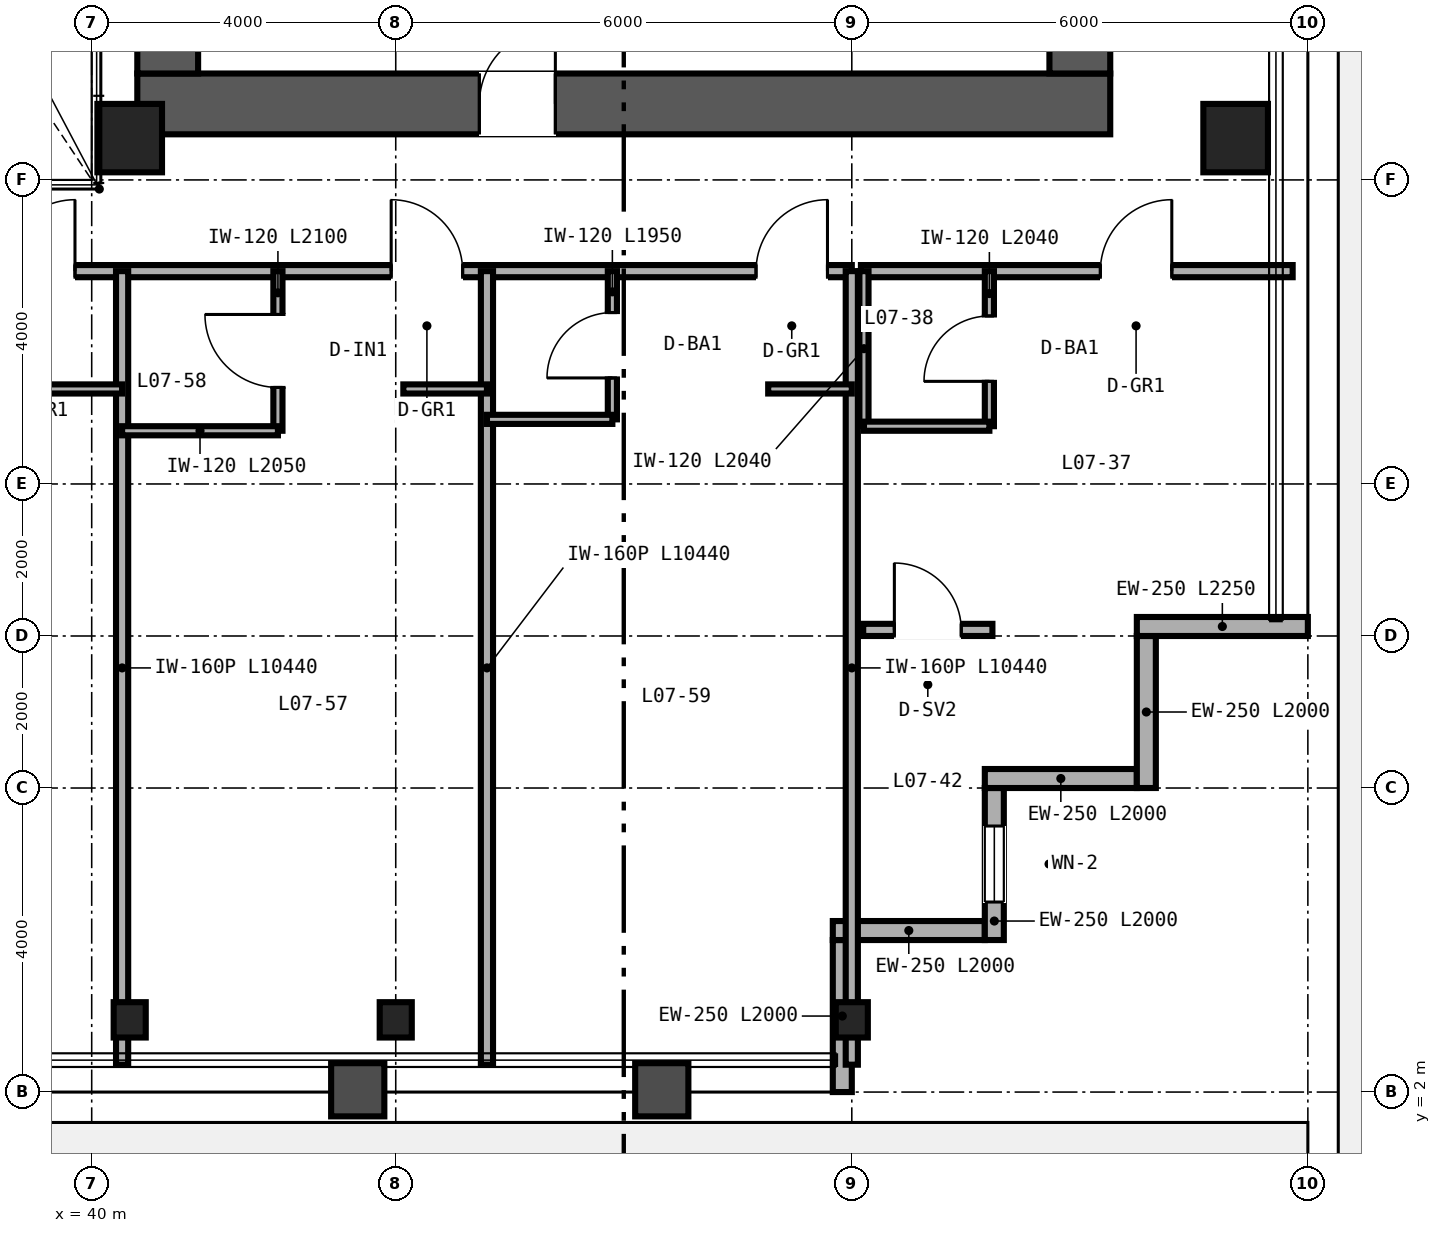
"""IFC4 building model, lengths in metres.
Left out: names, types, materials, properties, quantities, classifications, styles, units other than length and angle.
Written with IfcOpenShell. Run it as: python <this file> out.ifc"""

import sys

from ifc_helpers import new_model, si_unit, direction, frame, frame_2d, origin, origin_2d, place, context, subcontext, project, spatial, rectangle, hollow_rectangle, i_section, extrude, source, transform, mapped, element, fill, save


model = new_model("IFC4")
c1 = context("Model", 3, precision=1e-05, world=origin(), true_north=direction((0.0, 1.0)))
c2 = subcontext(c1, "Body", "Model", "MODEL_VIEW")
j1 = project(units=[si_unit("LENGTHUNIT", "METRE"), si_unit("PLANEANGLEUNIT", "RADIAN")], contexts=[c1])
p1 = place(None, origin())
s1 = spatial("IfcSite", under=j1, at=p1, CompositionType="ELEMENT")
p2 = place(p1, origin())
s2 = spatial("IfcBuilding", under=s1, at=p2, CompositionType="ELEMENT")
p3 = place(p2, frame((0.0, 0.0, 34.8)))
s3 = spatial("IfcBuildingStorey", under=s2, at=p3, CompositionType="ELEMENT", Elevation=34.8)
p4 = place(p3, frame((40.6, 15.0, 0.0), z_axis=(0.0, 0.0, 1.0), x_axis=(1.0, 0.0, 0.0)))
e1 = element("IfcWall", 1, at=p4, inside=s3, PredefinedType="SHEAR", context=c2, shape_type="SweptSolid", body=[
    extrude(rectangle(XDim=12.8, YDim=0.8, at=frame_2d((6.4, 0.0))), origin(), (0.0, 0.0, 1.0), 3.35),
])
p5 = place(p4, frame((4.5, 0.0, 0.0)))
e2 = element("IfcOpeningElement", 2, at=p5, cuts=e1, PredefinedType="OPENING", context=c2, shape_type="SweptSolid", body=[
    extrude(rectangle(XDim=1.0, YDim=2.15, at=frame_2d((0.5, 1.075))), frame((0.0, 0.41, 0.0), z_axis=(0.0, -1.0, 0.0), x_axis=(1.0, 0.0, 0.0)), (0.0, 0.0, 1.0), 0.82),
])
for number, where, z_axis, x_axis in (
    (3, (41.0, 15.4, 0.0), (0.0, 0.0, 1.0), (0.0, 1.0, 0.0)),
    (4, (53.0, 15.4, 0.0), (0.0, 0.0, 1.0), (0.0, 1.0, 0.0)),
):
    element("IfcWall", number, at=place(p3, frame(where, z_axis=z_axis, x_axis=x_axis)), inside=s3, PredefinedType="SHEAR", context=c2, shape_type="SweptSolid", body=[
        extrude(rectangle(XDim=21.2, YDim=0.8, at=frame_2d((10.6, 0.0))), origin(), (0.0, 0.0, 1.0), 3.35),
    ])
m1 = source(origin(), c2, "Body", "SweptSolid", [
    extrude(hollow_rectangle(XDim=0.85, YDim=0.9, WallThickness=0.04, at=origin_2d()), origin(), (0.0, 0.0, 1.0), 3.35),
])
for number, where, z_axis, x_axis in (
    (5, (40.5, 14.55, 0.0), (0.0, 0.0, 1.0), (1.0, 0.0, 0.0)),
    (6, (55.05, 14.55, 0.0), (0.0, 0.0, 1.0), (1.0, 0.0, 0.0)),
):
    element("IfcColumn", number, at=place(p3, frame(where, z_axis=z_axis, x_axis=x_axis)), inside=s3, PredefinedType="COLUMN", context=c2, shape_type="MappedRepresentation", body=[
        mapped(m1, transform((0.0, 0.0, 0.0), scale=1.0)),
    ])
m2 = source(origin(), c2, "Body", "SweptSolid", [
    extrude(i_section(OverallWidth=0.422, OverallDepth=0.465, WebThickness=0.045, FlangeThickness=0.073, FilletRadius=0.025, at=origin_2d()), origin(), (0.0, 0.0, 1.0), 3.35),
])
for number, where, z_axis, x_axis in (
    (7, (40.5, 2.95, 0.0), (0.0, 0.0, 1.0), (1.0, 0.0, 0.0)),
    (8, (44.0, 2.95, 0.0), (0.0, 0.0, 1.0), (1.0, 0.0, 0.0)),
    (9, (50.0, 2.95, 0.0), (0.0, 0.0, 1.0), (1.0, 0.0, 0.0)),
):
    element("IfcColumn", number, at=place(p3, frame(where, z_axis=z_axis, x_axis=x_axis)), inside=s3, PredefinedType="COLUMN", context=c2, shape_type="MappedRepresentation", body=[
        mapped(m2, transform((0.0, 0.0, 0.0), scale=1.0)),
    ])
p6 = place(p3, frame((49.875, 2.0, 0.0), z_axis=(0.0, 0.0, 1.0), x_axis=(0.0, 1.0, 0.0)))
e10 = element("IfcWall", 10, at=p6, inside=s3, PredefinedType="SOLIDWALL", context=c2, shape_type="SweptSolid", body=[
    extrude(rectangle(XDim=2.0, YDim=0.25, at=frame_2d((1.0, 0.0))), origin(), (0.0, 0.0, 1.0), 2.657),
])
p7 = place(p3, frame((49.75, 4.125, 0.0), z_axis=(0.0, 0.0, 1.0), x_axis=(1.0, 0.0, 0.0)))
e11 = element("IfcWall", 11, at=p7, inside=s3, PredefinedType="SOLIDWALL", context=c2, shape_type="SweptSolid", body=[
    extrude(rectangle(XDim=2.0, YDim=0.25, at=frame_2d((1.0, 0.0))), origin(), (0.0, 0.0, 1.0), 3.35),
])
p8 = place(p3, frame((51.875, 4.0, 0.0), z_axis=(0.0, 0.0, 1.0), x_axis=(0.0, 1.0, 0.0)))
e12 = element("IfcWall", 12, at=p8, inside=s3, PredefinedType="SOLIDWALL", context=c2, shape_type="SweptSolid", body=[
    extrude(rectangle(XDim=2.0, YDim=0.25, at=frame_2d((1.0, 0.0))), origin(), (0.0, 0.0, 1.0), 3.35),
])
p9 = place(p8, frame((0.5, 0.0, 0.85)))
e13 = element("IfcOpeningElement", 13, at=p9, cuts=e12, PredefinedType="OPENING", context=c2, shape_type="SweptSolid", body=[
    extrude(rectangle(XDim=1.0, YDim=1.9, at=frame_2d((0.5, 0.95))), frame((0.0, 0.135, 0.0), z_axis=(0.0, -1.0, 0.0), x_axis=(1.0, 0.0, 0.0)), (0.0, 0.0, 1.0), 0.27),
])
for number, where, z_axis, x_axis in (
    (14, (51.75, 6.125, 0.0), (0.0, 0.0, 1.0), (1.0, 0.0, 0.0)),
    (15, (53.875, 6.0, 0.0), (0.0, 0.0, 1.0), (0.0, 1.0, 0.0)),
):
    element("IfcWall", number, at=place(p3, frame(where, z_axis=z_axis, x_axis=x_axis)), inside=s3, PredefinedType="SOLIDWALL", context=c2, shape_type="SweptSolid", body=[
        extrude(rectangle(XDim=2.0, YDim=0.25, at=frame_2d((1.0, 0.0))), origin(), (0.0, 0.0, 1.0), 3.35),
    ])
p10 = place(p3, frame((53.75, 8.125, 0.0), z_axis=(0.0, 0.0, 1.0), x_axis=(1.0, 0.0, 0.0)))
e16 = element("IfcWall", 16, at=p10, inside=s3, PredefinedType="SOLIDWALL", context=c2, shape_type="SweptSolid", body=[
    extrude(rectangle(XDim=2.25, YDim=0.25, at=frame_2d((1.125, 0.0))), origin(), (0.0, 0.0, 1.0), 3.35),
])
p11 = place(p3, frame((50.12, 12.8, 0.0), z_axis=(0.0, 0.0, 1.0), x_axis=(1.0, 0.0, 0.0)))
e17 = element("IfcWall", 17, at=p11, inside=s3, PredefinedType="PARTITIONING", context=c2, shape_type="SweptSolid", body=[
    extrude(rectangle(XDim=5.68, YDim=0.16, at=frame_2d((2.84, 0.0))), origin(), (0.0, 0.0, 1.0), 3.35),
])
p12 = place(p11, frame((3.15, 0.0, 0.0)))
e18 = element("IfcOpeningElement", 18, at=p12, cuts=e17, PredefinedType="OPENING", context=c2, shape_type="SweptSolid", body=[
    extrude(rectangle(XDim=0.94, YDim=2.15, at=frame_2d((0.47, 1.075))), frame((0.0, 0.09, 0.0), z_axis=(0.0, -1.0, 0.0), x_axis=(1.0, 0.0, 0.0)), (0.0, 0.0, 1.0), 0.18),
])
p13 = place(p3, frame((51.81, 10.76, 0.0), z_axis=(0.0, 0.0, 1.0), x_axis=(0.0, 1.0, 0.0)))
e19 = element("IfcWall", 19, at=p13, inside=s3, PredefinedType="PARTITIONING", context=c2, shape_type="SweptSolid", body=[
    extrude(rectangle(XDim=2.04, YDim=0.12, at=frame_2d((1.02, 0.0))), origin(), (0.0, 0.0, 1.0), 3.35),
])
p14 = place(p13, frame((0.59, 0.0, 0.0)))
e20 = element("IfcOpeningElement", 20, at=p14, cuts=e19, PredefinedType="OPENING", context=c2, shape_type="SweptSolid", body=[
    extrude(rectangle(XDim=0.86, YDim=2.1, at=frame_2d((0.43, 1.05))), frame((0.0, 0.07, 0.0), z_axis=(0.0, -1.0, 0.0), x_axis=(1.0, 0.0, 0.0)), (0.0, 0.0, 1.0), 0.14),
])
p15 = place(p3, frame((50.16, 10.76, 0.0), z_axis=(0.0, 0.0, 1.0), x_axis=(0.0, 1.0, 0.0)))
e21 = element("IfcWall", 21, at=p15, inside=s3, PredefinedType="PARTITIONING", context=c2, shape_type="SweptSolid", body=[
    extrude(rectangle(XDim=2.04, YDim=0.12, at=frame_2d((1.02, 0.0))), origin(), (0.0, 0.0, 1.0), 3.35),
])
p16 = place(p3, frame((50.16, 10.76, 0.0), z_axis=(0.0, 0.0, 1.0), x_axis=(1.0, 0.0, 0.0)))
e22 = element("IfcWall", 22, at=p16, inside=s3, PredefinedType="PARTITIONING", context=c2, shape_type="SweptSolid", body=[
    extrude(rectangle(XDim=1.65, YDim=0.12, at=frame_2d((0.825, 0.0))), origin(), (0.0, 0.0, 1.0), 3.35),
])
p17 = place(p3, frame((50.15, 8.08, 0.0), z_axis=(0.0, 0.0, 1.0), x_axis=(1.0, 0.0, 0.0)))
e23 = element("IfcWall", 23, at=p17, inside=s3, PredefinedType="PARTITIONING", context=c2, shape_type="SweptSolid", body=[
    extrude(rectangle(XDim=1.7, YDim=0.16, at=frame_2d((0.85, 0.0))), origin(), (0.0, 0.0, 1.0), 3.35),
])
p18 = place(p17, frame((0.41, 0.0, 0.0)))
e24 = element("IfcOpeningElement", 24, at=p18, cuts=e23, PredefinedType="OPENING", context=c2, shape_type="SweptSolid", body=[
    extrude(rectangle(XDim=0.88, YDim=2.15, at=frame_2d((0.44, 1.075))), frame((0.0, 0.09, 0.0), z_axis=(0.0, -1.0, 0.0), x_axis=(1.0, 0.0, 0.0)), (0.0, 0.0, 1.0), 0.18),
])
p19 = place(p3, frame((14.0, 12.8, 0.0), z_axis=(0.0, 0.0, 1.0), x_axis=(1.0, 0.0, 0.0)))
e25 = element("IfcWall", 25, at=p19, inside=s3, PredefinedType="PARTITIONING", context=c2, shape_type="SweptSolid", body=[
    extrude(rectangle(XDim=36.0, YDim=0.16, at=frame_2d((18.0, 0.0))), origin(), (0.0, 0.0, 1.0), 2.571),
])
p20 = place(p19, frame((2.94, 0.0, 0.0)))
e26 = element("IfcOpeningElement", 26, at=p20, cuts=e25, PredefinedType="OPENING", context=c2, shape_type="SweptSolid", body=[
    extrude(rectangle(XDim=0.94, YDim=2.15, at=frame_2d((0.47, 1.075))), frame((0.0, 0.09, 0.0), z_axis=(0.0, -1.0, 0.0), x_axis=(1.0, 0.0, 0.0)), (0.0, 0.0, 1.0), 0.18),
])
p21 = place(p19, frame((7.14, 0.0, 0.0)))
e27 = element("IfcOpeningElement", 27, at=p21, cuts=e25, PredefinedType="OPENING", context=c2, shape_type="SweptSolid", body=[
    extrude(rectangle(XDim=0.94, YDim=2.15, at=frame_2d((0.47, 1.075))), frame((0.0, 0.09, 0.0), z_axis=(0.0, -1.0, 0.0), x_axis=(1.0, 0.0, 0.0)), (0.0, 0.0, 1.0), 0.18),
])
p22 = place(p19, frame((11.54, 0.0, 0.0)))
e28 = element("IfcOpeningElement", 28, at=p22, cuts=e25, PredefinedType="OPENING", context=c2, shape_type="SweptSolid", body=[
    extrude(rectangle(XDim=0.94, YDim=2.15, at=frame_2d((0.47, 1.075))), frame((0.0, 0.09, 0.0), z_axis=(0.0, -1.0, 0.0), x_axis=(1.0, 0.0, 0.0)), (0.0, 0.0, 1.0), 0.18),
])
p23 = place(p19, frame((15.94, 0.0, 0.0)))
e29 = element("IfcOpeningElement", 29, at=p23, cuts=e25, PredefinedType="OPENING", context=c2, shape_type="SweptSolid", body=[
    extrude(rectangle(XDim=0.94, YDim=2.15, at=frame_2d((0.47, 1.075))), frame((0.0, 0.09, 0.0), z_axis=(0.0, -1.0, 0.0), x_axis=(1.0, 0.0, 0.0)), (0.0, 0.0, 1.0), 0.18),
])
p24 = place(p19, frame((20.54, 0.0, 0.0)))
e30 = element("IfcOpeningElement", 30, at=p24, cuts=e25, PredefinedType="OPENING", context=c2, shape_type="SweptSolid", body=[
    extrude(rectangle(XDim=0.94, YDim=2.15, at=frame_2d((0.47, 1.075))), frame((0.0, 0.09, 0.0), z_axis=(0.0, -1.0, 0.0), x_axis=(1.0, 0.0, 0.0)), (0.0, 0.0, 1.0), 0.18),
])
p25 = place(p19, frame((24.84, 0.0, 0.0)))
e31 = element("IfcOpeningElement", 31, at=p25, cuts=e25, PredefinedType="OPENING", context=c2, shape_type="SweptSolid", body=[
    extrude(rectangle(XDim=0.94, YDim=2.15, at=frame_2d((0.47, 1.075))), frame((0.0, 0.09, 0.0), z_axis=(0.0, -1.0, 0.0), x_axis=(1.0, 0.0, 0.0)), (0.0, 0.0, 1.0), 0.18),
])
p26 = place(p19, frame((29.94, 0.0, 0.0)))
e32 = element("IfcOpeningElement", 32, at=p26, cuts=e25, PredefinedType="OPENING", context=c2, shape_type="SweptSolid", body=[
    extrude(rectangle(XDim=0.94, YDim=2.15, at=frame_2d((0.47, 1.075))), frame((0.0, 0.09, 0.0), z_axis=(0.0, -1.0, 0.0), x_axis=(1.0, 0.0, 0.0)), (0.0, 0.0, 1.0), 0.18),
])
p27 = place(p19, frame((34.74, 0.0, 0.0)))
e33 = element("IfcOpeningElement", 33, at=p27, cuts=e25, PredefinedType="OPENING", context=c2, shape_type="SweptSolid", body=[
    extrude(rectangle(XDim=0.94, YDim=2.15, at=frame_2d((0.47, 1.075))), frame((0.0, 0.09, 0.0), z_axis=(0.0, -1.0, 0.0), x_axis=(1.0, 0.0, 0.0)), (0.0, 0.0, 1.0), 0.18),
])
p28 = place(p3, frame((50.0, 2.36, 0.0), z_axis=(0.0, 0.0, 1.0), x_axis=(0.0, 1.0, 0.0)))
e34 = element("IfcWall", 34, at=p28, inside=s3, PredefinedType="PARTITIONING", context=c2, shape_type="SweptSolid", body=[
    extrude(rectangle(XDim=10.44, YDim=0.16, at=frame_2d((5.22, 0.0))), origin(), (0.0, 0.0, 1.0), 2.657),
])
p29 = place(p3, frame((40.4, 2.36, 0.0), z_axis=(0.0, 0.0, 1.0), x_axis=(0.0, 1.0, 0.0)))
e35 = element("IfcWall", 35, at=p29, inside=s3, PredefinedType="PARTITIONING", context=c2, shape_type="SweptSolid", body=[
    extrude(rectangle(XDim=10.44, YDim=0.16, at=frame_2d((5.22, 0.0))), origin(), (0.0, 0.0, 1.0), 2.423),
])
p30 = place(p3, frame((39.3, 11.25, 0.0), z_axis=(0.0, 0.0, 1.0), x_axis=(1.0, 0.0, 0.0)))
e36 = element("IfcWall", 36, at=p30, inside=s3, PredefinedType="PARTITIONING", context=c2, shape_type="SweptSolid", body=[
    extrude(rectangle(XDim=1.1, YDim=0.12, at=frame_2d((0.55, 0.0))), origin(), (0.0, 0.0, 1.0), 2.571),
])
p31 = place(p3, frame((45.2, 2.36, 0.0), z_axis=(0.0, 0.0, 1.0), x_axis=(0.0, 1.0, 0.0)))
e37 = element("IfcWall", 37, at=p31, inside=s3, PredefinedType="PARTITIONING", context=c2, shape_type="SweptSolid", body=[
    extrude(rectangle(XDim=10.44, YDim=0.16, at=frame_2d((5.22, 0.0))), origin(), (0.0, 0.0, 1.0), 2.657),
])
p32 = place(p3, frame((42.45, 10.7, 0.0), z_axis=(0.0, 0.0, 1.0), x_axis=(0.0, 1.0, 0.0)))
e38 = element("IfcWall", 38, at=p32, inside=s3, PredefinedType="PARTITIONING", context=c2, shape_type="SweptSolid", body=[
    extrude(rectangle(XDim=2.1, YDim=0.12, at=frame_2d((1.05, 0.0))), origin(), (0.0, 0.0, 1.0), 3.35),
])
p33 = place(p32, frame((0.57, 0.0, 0.0)))
e39 = element("IfcOpeningElement", 39, at=p33, cuts=e38, PredefinedType="OPENING", context=c2, shape_type="SweptSolid", body=[
    extrude(rectangle(XDim=0.96, YDim=2.15, at=frame_2d((0.48, 1.075))), frame((0.0, 0.07, 0.0), z_axis=(0.0, -1.0, 0.0), x_axis=(1.0, 0.0, 0.0)), (0.0, 0.0, 1.0), 0.14),
])
p34 = place(p3, frame((40.4, 10.7, 0.0), z_axis=(0.0, 0.0, 1.0), x_axis=(1.0, 0.0, 0.0)))
e40 = element("IfcWall", 40, at=p34, inside=s3, PredefinedType="PARTITIONING", context=c2, shape_type="SweptSolid", body=[
    extrude(rectangle(XDim=2.05, YDim=0.12, at=frame_2d((1.025, 0.0))), origin(), (0.0, 0.0, 1.0), 2.571),
])
p35 = place(p3, frame((44.1, 11.25, 0.0), z_axis=(0.0, 0.0, 1.0), x_axis=(1.0, 0.0, 0.0)))
e41 = element("IfcWall", 41, at=p35, inside=s3, PredefinedType="PARTITIONING", context=c2, shape_type="SweptSolid", body=[
    extrude(rectangle(XDim=1.1, YDim=0.12, at=frame_2d((0.55, 0.0))), origin(), (0.0, 0.0, 1.0), 3.35),
])
p36 = place(p3, frame((46.85, 10.85, 0.0), z_axis=(0.0, 0.0, 1.0), x_axis=(0.0, 1.0, 0.0)))
e42 = element("IfcWall", 42, at=p36, inside=s3, PredefinedType="PARTITIONING", context=c2, shape_type="SweptSolid", body=[
    extrude(rectangle(XDim=1.95, YDim=0.12, at=frame_2d((0.975, 0.0))), origin(), (0.0, 0.0, 1.0), 3.35),
])
p37 = place(p36, frame((0.545, 0.0, 0.0)))
e43 = element("IfcOpeningElement", 43, at=p37, cuts=e42, PredefinedType="OPENING", context=c2, shape_type="SweptSolid", body=[
    extrude(rectangle(XDim=0.86, YDim=2.1, at=frame_2d((0.43, 1.05))), frame((0.0, 0.07, 0.0), z_axis=(0.0, -1.0, 0.0), x_axis=(1.0, 0.0, 0.0)), (0.0, 0.0, 1.0), 0.14),
])
p38 = place(p3, frame((45.2, 10.85, 0.0), z_axis=(0.0, 0.0, 1.0), x_axis=(1.0, 0.0, 0.0)))
e44 = element("IfcWall", 44, at=p38, inside=s3, PredefinedType="PARTITIONING", context=c2, shape_type="SweptSolid", body=[
    extrude(rectangle(XDim=1.65, YDim=0.12, at=frame_2d((0.825, 0.0))), origin(), (0.0, 0.0, 1.0), 3.35),
])
p39 = place(p3, frame((48.9, 11.25, 0.0), z_axis=(0.0, 0.0, 1.0), x_axis=(1.0, 0.0, 0.0)))
e45 = element("IfcWall", 45, at=p39, inside=s3, PredefinedType="PARTITIONING", context=c2, shape_type="SweptSolid", body=[
    extrude(rectangle(XDim=1.1, YDim=0.12, at=frame_2d((0.55, 0.0))), origin(), (0.0, 0.0, 1.0), 3.35),
])
m3 = source(origin(), c2, "Body", "SweptSolid", [
    extrude(rectangle(XDim=1.0, YDim=1.9, at=frame_2d((0.5, 0.95))), frame((0.0, 0.03, 0.0), z_axis=(0.0, -1.0, 0.0), x_axis=(1.0, 0.0, 0.0)), (0.0, 0.0, 1.0), 0.06),
])
p40 = place(p9, origin())
e46 = element("IfcWindow", 46, at=p40, inside=s3, PartitioningType="SINGLE_PANEL", PredefinedType="WINDOW", context=c2, shape_type="MappedRepresentation", body=[
    mapped(m3, transform((0.0, 0.0, 0.0), scale=1.0)),
])
fill(e13, e46)
m4 = source(origin(), c2, "Body", "SweptSolid", [
    extrude(rectangle(XDim=1.0, YDim=2.15, at=frame_2d((0.5, 1.075))), frame((0.0, 0.025, 0.0), z_axis=(0.0, -1.0, 0.0), x_axis=(1.0, 0.0, 0.0)), (0.0, 0.0, 1.0), 0.05),
])
p41 = place(p5, origin())
e47 = element("IfcDoor", 47, at=p41, inside=s3, OperationType="SINGLE_SWING_RIGHT", PredefinedType="DOOR", context=c2, shape_type="MappedRepresentation", body=[
    mapped(m4, transform((0.0, 0.0, 0.0), scale=1.0)),
])
fill(e2, e47)
m5 = source(origin(), c2, "Body", "SweptSolid", [
    extrude(rectangle(XDim=0.86, YDim=2.1, at=frame_2d((0.43, 1.05))), frame((0.0, 0.025, 0.0), z_axis=(0.0, -1.0, 0.0), x_axis=(1.0, 0.0, 0.0)), (0.0, 0.0, 1.0), 0.05),
])
p42 = place(p14, origin())
e48 = element("IfcDoor", 48, at=p42, inside=s3, OperationType="SINGLE_SWING_LEFT", PredefinedType="DOOR", context=c2, shape_type="MappedRepresentation", body=[
    mapped(m5, transform((0.0, 0.0, 0.0), scale=1.0)),
])
fill(e20, e48)
m6 = source(origin(), c2, "Body", "SweptSolid", [
    extrude(rectangle(XDim=0.94, YDim=2.15, at=frame_2d((0.47, 1.075))), frame((0.0, 0.025, 0.0), z_axis=(0.0, -1.0, 0.0), x_axis=(1.0, 0.0, 0.0)), (0.0, 0.0, 1.0), 0.05),
])
p43 = place(p12, origin())
e49 = element("IfcDoor", 49, at=p43, inside=s3, OperationType="SINGLE_SWING_RIGHT", PredefinedType="DOOR", context=c2, shape_type="MappedRepresentation", body=[
    mapped(m6, transform((0.0, 0.0, 0.0), scale=1.0)),
])
fill(e18, e49)
m7 = source(origin(), c2, "Body", "SweptSolid", [
    extrude(rectangle(XDim=0.88, YDim=2.15, at=frame_2d((0.44, 1.075))), frame((0.0, 0.025, 0.0), z_axis=(0.0, -1.0, 0.0), x_axis=(1.0, 0.0, 0.0)), (0.0, 0.0, 1.0), 0.05),
])
p44 = place(p18, origin())
e50 = element("IfcDoor", 50, at=p44, inside=s3, OperationType="SINGLE_SWING_LEFT", PredefinedType="DOOR", context=c2, shape_type="MappedRepresentation", body=[
    mapped(m7, transform((0.0, 0.0, 0.0), scale=1.0)),
])
fill(e24, e50)
m8 = source(origin(), c2, "Body", "SweptSolid", [
    extrude(rectangle(XDim=0.96, YDim=2.15, at=frame_2d((0.48, 1.075))), frame((0.0, 0.025, 0.0), z_axis=(0.0, -1.0, 0.0), x_axis=(1.0, 0.0, 0.0)), (0.0, 0.0, 1.0), 0.05),
])
p45 = place(p33, origin())
e51 = element("IfcDoor", 51, at=p45, inside=s3, OperationType="SINGLE_SWING_RIGHT", PredefinedType="DOOR", context=c2, shape_type="MappedRepresentation", body=[
    mapped(m8, transform((0.0, 0.0, 0.0), scale=1.0)),
])
fill(e39, e51)
p46 = place(p37, origin())
e52 = element("IfcDoor", 52, at=p46, inside=s3, OperationType="SINGLE_SWING_LEFT", PredefinedType="DOOR", context=c2, shape_type="MappedRepresentation", body=[
    mapped(m5, transform((0.0, 0.0, 0.0), scale=1.0)),
])
fill(e43, e52)
p47 = place(p25, origin())
e53 = element("IfcDoor", 53, at=p47, inside=s3, OperationType="SINGLE_SWING_RIGHT", PredefinedType="DOOR", context=c2, shape_type="MappedRepresentation", body=[
    mapped(m6, transform((0.0, 0.0, 0.0), scale=1.0)),
])
fill(e31, e53)
p48 = place(p26, origin())
e54 = element("IfcDoor", 54, at=p48, inside=s3, OperationType="SINGLE_SWING_LEFT", PredefinedType="DOOR", context=c2, shape_type="MappedRepresentation", body=[
    mapped(m6, transform((0.0, 0.0, 0.0), scale=1.0)),
])
fill(e32, e54)
p49 = place(p27, origin())
e55 = element("IfcDoor", 55, at=p49, inside=s3, OperationType="SINGLE_SWING_RIGHT", PredefinedType="DOOR", context=c2, shape_type="MappedRepresentation", body=[
    mapped(m6, transform((0.0, 0.0, 0.0), scale=1.0)),
])
fill(e33, e55)
save(model, sys.argv[1])
